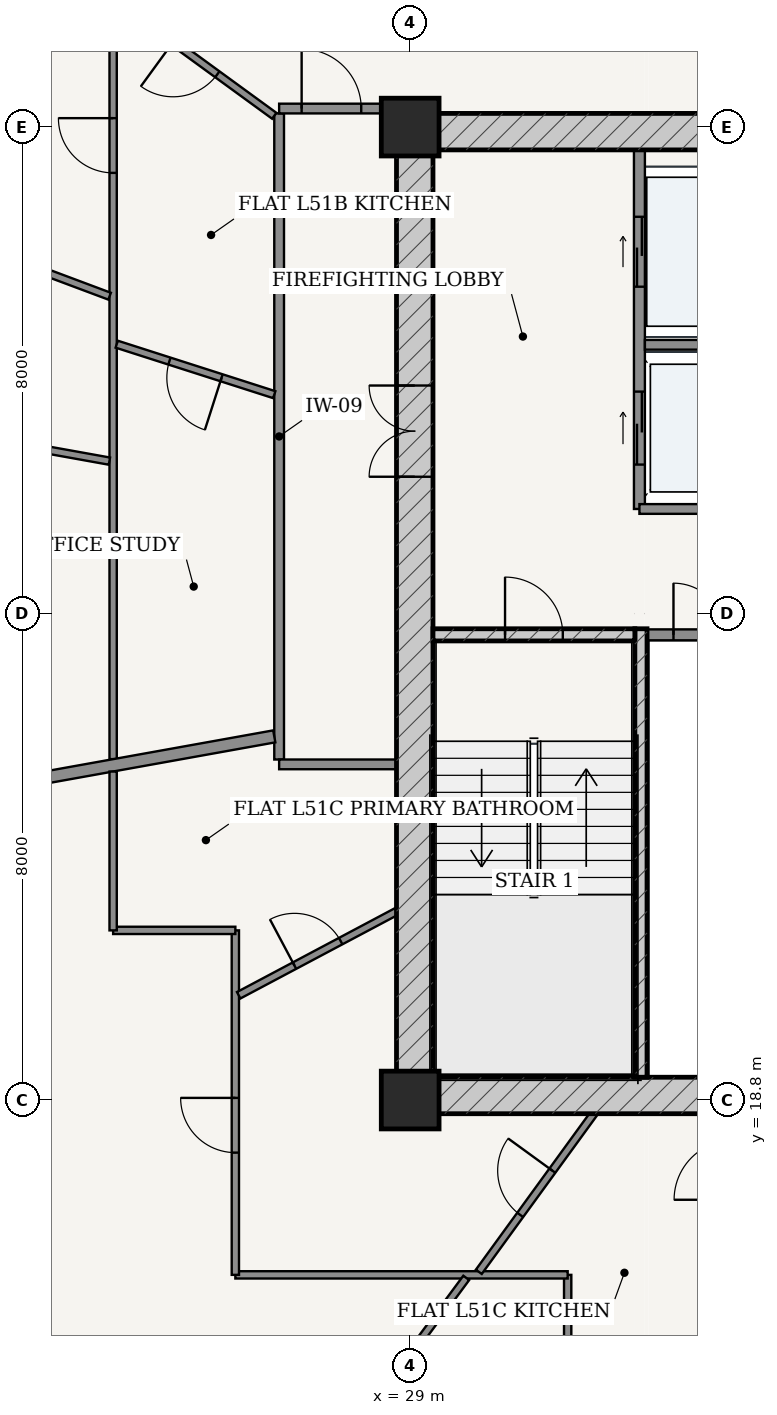
"""IFC4 building model, lengths in metres.
Left out: names, types, materials, properties, quantities, classifications, styles, units other than length and angle.
Written with IfcOpenShell. Run it as: python <this file> out.ifc"""

import sys

from ifc_helpers import new_model, si_unit, direction, frame, frame_2d, origin, origin_2d, place, context, subcontext, project, spatial, rectangle, extrude, source, transform, mapped, element, fill, save


model = new_model("IFC4")
c1 = context("Model", 3, precision=1e-05, world=origin(), true_north=direction((-0.2419218956, 0.970295726276)))
c2 = subcontext(c1, "Body", "Model", "MODEL_VIEW")
j1 = project(units=[si_unit("LENGTHUNIT", "METRE"), si_unit("PLANEANGLEUNIT", "RADIAN")], contexts=[c1])
p1 = place(None, origin())
s1 = spatial("IfcSite", under=j1, at=p1, CompositionType="ELEMENT")
p2 = place(p1, origin())
s2 = spatial("IfcBuilding", under=s1, at=p2, CompositionType="ELEMENT")
p3 = place(p2, frame((0.0, 0.0, 194.9)))
s3 = spatial("IfcBuildingStorey", under=s2, at=p3, CompositionType="ELEMENT", Elevation=194.9)
for number, where, z_axis, x_axis in (
    (1, (29.0, 18.8, 0.0), (0.0, 0.0, 1.0), (1.0, 0.0, 0.0)),
    (2, (29.0, 34.8, 0.0), (0.0, 0.0, 1.0), (1.0, 0.0, 0.0)),
):
    element("IfcColumn", number, at=place(p3, frame(where, z_axis=z_axis, x_axis=x_axis)), inside=s3, PredefinedType="COLUMN", context=c2, shape_type="SweptSolid", body=[
        extrude(rectangle(XDim=0.95, YDim=0.95, at=origin_2d()), origin(), (0.0, 0.0, 1.0), 3.7),
    ])
p4 = place(p3, frame((28.775, 18.875, 0.0), z_axis=(0.0, 0.0, 1.0), x_axis=(1.0, 0.0, 0.0)))
e3 = element("IfcWall", 3, at=p4, inside=s3, PredefinedType="SHEAR", context=c2, shape_type="SweptSolid", body=[
    extrude(rectangle(XDim=18.45, YDim=0.6, at=frame_2d((9.225, 0.0))), origin(), (0.0, 0.0, 1.0), 3.435),
])
p5 = place(p4, frame((8.8, 0.0, 0.0)))
e4 = element("IfcOpeningElement", 4, at=p5, cuts=e3, PredefinedType="OPENING", context=c2, shape_type="SweptSolid", body=[
    extrude(rectangle(XDim=0.85, YDim=2.1, at=frame_2d((0.425, 1.05))), frame((0.0, 0.31, 0.0), z_axis=(0.0, -1.0, 0.0), x_axis=(1.0, 0.0, 0.0)), (0.0, 0.0, 1.0), 0.62),
])
p6 = place(p3, frame((28.775, 34.725, 0.0), z_axis=(0.0, 0.0, 1.0), x_axis=(1.0, 0.0, 0.0)))
e5 = element("IfcWall", 5, at=p6, inside=s3, PredefinedType="SHEAR", context=c2, shape_type="SweptSolid", body=[
    extrude(rectangle(XDim=18.45, YDim=0.6, at=frame_2d((9.225, 0.0))), origin(), (0.0, 0.0, 1.0), 3.435),
])
p7 = place(p3, frame((29.075, 19.175, 0.0), z_axis=(0.0, 0.0, 1.0), x_axis=(0.0, 1.0, 0.0)))
e6 = element("IfcWall", 6, at=p7, inside=s3, PredefinedType="SHEAR", context=c2, shape_type="SweptSolid", body=[
    extrude(rectangle(XDim=15.25, YDim=0.6, at=frame_2d((7.625, 0.0))), origin(), (0.0, 0.0, 1.0), 3.435),
])
p8 = place(p7, frame((9.875, 0.0, 0.0)))
e7 = element("IfcOpeningElement", 7, at=p8, cuts=e6, PredefinedType="OPENING", context=c2, shape_type="SweptSolid", body=[
    extrude(rectangle(XDim=1.5, YDim=2.2, at=frame_2d((0.75, 1.1))), frame((0.0, 0.31, 0.0), z_axis=(0.0, -1.0, 0.0), x_axis=(1.0, 0.0, 0.0)), (0.0, 0.0, 1.0), 0.62),
])
p9 = place(p3, frame((32.795, 19.175, 0.0), z_axis=(0.0, 0.0, 1.0), x_axis=(0.0, 1.0, 0.0)))
e8 = element("IfcWall", 8, at=p9, inside=s3, PredefinedType="SOLIDWALL", context=c2, shape_type="SweptSolid", body=[
    extrude(rectangle(XDim=7.375, YDim=0.2, at=frame_2d((3.688, 0.0))), origin(), (0.0, 0.0, 1.0), 3.435),
])
p10 = place(p3, frame((29.375, 26.45, 0.0), z_axis=(0.0, 0.0, 1.0), x_axis=(1.0, 0.0, 0.0)))
e9 = element("IfcWall", 9, at=p10, inside=s3, PredefinedType="SOLIDWALL", context=c2, shape_type="SweptSolid", body=[
    extrude(rectangle(XDim=3.32, YDim=0.2, at=frame_2d((1.66, 0.0))), origin(), (0.0, 0.0, 1.0), 3.435),
])
p11 = place(p10, frame((1.185, 0.0, 0.0)))
e10 = element("IfcOpeningElement", 10, at=p11, cuts=e9, PredefinedType="OPENING", context=c2, shape_type="SweptSolid", body=[
    extrude(rectangle(XDim=0.95, YDim=2.15, at=frame_2d((0.475, 1.075))), frame((0.0, 0.11, 0.0), z_axis=(0.0, -1.0, 0.0), x_axis=(1.0, 0.0, 0.0)), (0.0, 0.0, 1.0), 0.22),
])
p12 = place(p3, frame((32.9, 26.45, 0.0), z_axis=(0.0, 0.0, 1.0), x_axis=(1.0, 0.0, 0.0)))
e11 = element("IfcWall", 11, at=p12, inside=s3, PredefinedType="PARTITIONING", context=c2, shape_type="SweptSolid", body=[
    extrude(rectangle(XDim=1.71, YDim=0.18, at=frame_2d((0.855, 0.0))), origin(), (0.0, 0.0, 1.0), 3.435),
])
p13 = place(p12, frame((0.43, 0.0, 0.0)))
e12 = element("IfcOpeningElement", 12, at=p13, cuts=e11, PredefinedType="OPENING", context=c2, shape_type="SweptSolid", body=[
    extrude(rectangle(XDim=0.85, YDim=2.1, at=frame_2d((0.425, 1.05))), frame((0.0, 0.1, 0.0), z_axis=(0.0, -1.0, 0.0), x_axis=(1.0, 0.0, 0.0)), (0.0, 0.0, 1.0), 0.2),
])
p14 = place(p3, frame((32.77, 28.52, 0.0), z_axis=(0.0, 0.0, 1.0), x_axis=(0.0, 1.0, 0.0)))
e13 = element("IfcWall", 13, at=p14, inside=s3, PredefinedType="PARTITIONING", context=c2, shape_type="SweptSolid", body=[
    extrude(rectangle(XDim=5.905, YDim=0.18, at=frame_2d((2.953, 0.0))), origin(), (0.0, 0.0, 1.0), 3.435),
])
p15 = place(p14, frame((3.655, 0.0, 0.0)))
e14 = element("IfcOpeningElement", 14, at=p15, cuts=e13, PredefinedType="OPENING", context=c2, shape_type="SweptSolid", body=[
    extrude(rectangle(XDim=1.15, YDim=2.2, at=frame_2d((0.575, 1.1))), frame((0.0, 0.1, 0.0), z_axis=(0.0, -1.0, 0.0), x_axis=(1.0, 0.0, 0.0)), (0.0, 0.0, 1.0), 0.2),
])
p16 = place(p14, frame((0.73, 0.0, 0.0)))
e15 = element("IfcOpeningElement", 15, at=p16, cuts=e13, PredefinedType="OPENING", context=c2, shape_type="SweptSolid", body=[
    extrude(rectangle(XDim=1.2, YDim=2.25, at=frame_2d((0.6, 1.125))), frame((0.0, 0.1, 0.0), z_axis=(0.0, -1.0, 0.0), x_axis=(1.0, 0.0, 0.0)), (0.0, 0.0, 1.0), 0.2),
])
p17 = place(p3, frame((32.86, 31.22, 0.0), z_axis=(0.0, 0.0, 1.0), x_axis=(1.0, 0.0, 0.0)))
e16 = element("IfcWall", 16, at=p17, inside=s3, PredefinedType="PARTITIONING", context=c2, shape_type="SweptSolid", body=[
    extrude(rectangle(XDim=1.75, YDim=0.16, at=frame_2d((0.875, 0.0))), origin(), (0.0, 0.0, 1.0), 3.435),
])
p18 = place(p3, frame((32.77, 28.52, 0.0), z_axis=(0.0, 0.0, 1.0), x_axis=(1.0, 0.0, 0.0)))
e17 = element("IfcWall", 17, at=p18, inside=s3, PredefinedType="PARTITIONING", context=c2, shape_type="SweptSolid", body=[
    extrude(rectangle(XDim=1.84, YDim=0.16, at=frame_2d((0.92, 0.0))), origin(), (0.0, 0.0, 1.0), 3.435),
])
p19 = place(p3, frame((26.845, 24.4, 0.0), z_axis=(0.0, 0.0, 1.0), x_axis=(0.0, 1.0, 0.0)))
e18 = element("IfcWall", 18, at=p19, inside=s3, PredefinedType="PARTITIONING", context=c2, shape_type="SweptSolid", body=[
    extrude(rectangle(XDim=10.625, YDim=0.16, at=frame_2d((5.312, 0.0))), origin(), (0.0, 0.0, 1.0), 2.951),
])
p20 = place(p3, frame((26.845, 35.105, 0.0), z_axis=(0.0, 0.0, 1.0), x_axis=(1.0, 0.0, 0.0)))
e19 = element("IfcWall", 19, at=p20, inside=s3, PredefinedType="PARTITIONING", context=c2, shape_type="SweptSolid", body=[
    extrude(rectangle(XDim=1.93, YDim=0.16, at=frame_2d((0.965, 0.0))), origin(), (0.0, 0.0, 1.0), 3.435),
])
p21 = place(p20, frame((0.37, 0.0, 0.0)))
e20 = element("IfcOpeningElement", 20, at=p21, cuts=e19, PredefinedType="OPENING", context=c2, shape_type="SweptSolid", body=[
    extrude(rectangle(XDim=0.98, YDim=2.2, at=frame_2d((0.49, 1.1))), frame((0.0, 0.09, 0.0), z_axis=(0.0, -1.0, 0.0), x_axis=(1.0, 0.0, 0.0)), (0.0, 0.0, 1.0), 0.18),
])
p22 = place(p3, frame((26.845, 24.32, 0.0), z_axis=(0.0, 0.0, 1.0), x_axis=(1.0, 0.0, 0.0)))
e21 = element("IfcWall", 21, at=p22, inside=s3, PredefinedType="PARTITIONING", context=c2, shape_type="SweptSolid", body=[
    extrude(rectangle(XDim=1.93, YDim=0.16, at=frame_2d((0.965, 0.0))), origin(), (0.0, 0.0, 1.0), 3.435),
])
p23 = place(p3, frame((24.115, 24.406, 0.0), z_axis=(0.0, 0.0, 1.0), x_axis=(0.0, 1.0, 0.0)))
e22 = element("IfcWall", 22, at=p23, inside=s3, PredefinedType="PARTITIONING", context=c2, shape_type="SweptSolid", body=[
    extrude(rectangle(XDim=13.429, YDim=0.12, at=frame_2d((6.714, 0.0))), origin(), (0.0, 0.0, 1.0), 2.951),
])
p24 = place(p23, frame((9.641, 0.0, 0.0)))
e23 = element("IfcOpeningElement", 23, at=p24, cuts=e22, PredefinedType="OPENING", context=c2, shape_type="SweptSolid", body=[
    extrude(rectangle(XDim=0.9, YDim=2.15, at=frame_2d((0.45, 1.075))), frame((0.0, 0.07, 0.0), z_axis=(0.0, -1.0, 0.0), x_axis=(1.0, 0.0, 0.0)), (0.0, 0.0, 1.0), 0.14),
])
p25 = place(p3, frame((24.057, 32.019, 0.0), z_axis=(0.0, 0.0, 1.0), x_axis=(-0.936540194592, 0.350560214389, 0.0)))
e24 = element("IfcWall", 24, at=p25, inside=s3, PredefinedType="PARTITIONING", context=c2, shape_type="SweptSolid", body=[
    extrude(rectangle(XDim=6.556, YDim=0.12, at=frame_2d((3.278, 0.0))), origin(), (0.0, 0.0, 1.0), 2.951),
])
p26 = place(p25, frame((2.828, 0.0, 0.0)))
e25 = element("IfcOpeningElement", 25, at=p26, cuts=e24, PredefinedType="OPENING", context=c2, shape_type="SweptSolid", body=[
    extrude(rectangle(XDim=0.9, YDim=2.15, at=frame_2d((0.45, 1.075))), frame((0.0, 0.07, 0.0), z_axis=(0.0, -1.0, 0.0), x_axis=(1.0, 0.0, 0.0)), (0.0, 0.0, 1.0), 0.14),
])
p27 = place(p3, frame((24.054, 29.307, 0.0), z_axis=(0.0, 0.0, 1.0), x_axis=(-0.984227185588, 0.176909149424, 0.0)))
e26 = element("IfcWall", 26, at=p27, inside=s3, PredefinedType="PARTITIONING", context=c2, shape_type="SweptSolid", body=[
    extrude(rectangle(XDim=7.448, YDim=0.12, at=frame_2d((3.724, 0.0))), origin(), (0.0, 0.0, 1.0), 2.951),
])
p28 = place(p27, frame((2.264, 0.0, 0.0)))
e27 = element("IfcOpeningElement", 27, at=p28, cuts=e26, PredefinedType="OPENING", context=c2, shape_type="SweptSolid", body=[
    extrude(rectangle(XDim=0.9, YDim=2.15, at=frame_2d((0.45, 1.075))), frame((0.0, 0.07, 0.0), z_axis=(0.0, -1.0, 0.0), x_axis=(1.0, 0.0, 0.0)), (0.0, 0.0, 1.0), 0.14),
])
p29 = place(p3, frame((34.397, 35.027, 0.0), z_axis=(0.0, 0.0, 1.0), x_axis=(-0.401135725485, 0.916018629581, 0.0)))
e28 = element("IfcWall", 28, at=p29, inside=s3, PredefinedType="PARTITIONING", context=c2, shape_type="SweptSolid", body=[
    extrude(rectangle(XDim=2.829, YDim=0.12, at=frame_2d((1.415, 0.0))), origin(), (0.0, 0.0, 1.0), 3.435),
])
p30 = place(p29, frame((0.985, 0.0, 0.0)))
e29 = element("IfcOpeningElement", 29, at=p30, cuts=e28, PredefinedType="OPENING", context=c2, shape_type="SweptSolid", body=[
    extrude(rectangle(XDim=0.86, YDim=2.15, at=frame_2d((0.43, 1.075))), frame((0.0, 0.07, 0.0), z_axis=(0.0, -1.0, 0.0), x_axis=(1.0, 0.0, 0.0)), (0.0, 0.0, 1.0), 0.14),
])
p31 = place(p3, frame((26.765, 34.986, 0.0), z_axis=(0.0, 0.0, 1.0), x_axis=(-0.808220499107, 0.588879974887, 0.0)))
e30 = element("IfcWall", 30, at=p31, inside=s3, PredefinedType="PARTITIONING", context=c2, shape_type="SweptSolid", body=[
    extrude(rectangle(XDim=3.217, YDim=0.12, at=frame_2d((1.608, 0.0))), origin(), (0.0, 0.0, 1.0), 3.11),
])
p32 = place(p31, frame((1.158, 0.0, 0.0)))
e31 = element("IfcOpeningElement", 31, at=p32, cuts=e30, PredefinedType="OPENING", context=c2, shape_type="SweptSolid", body=[
    extrude(rectangle(XDim=0.9, YDim=2.15, at=frame_2d((0.45, 1.075))), frame((0.0, 0.07, 0.0), z_axis=(0.0, -1.0, 0.0), x_axis=(1.0, 0.0, 0.0)), (0.0, 0.0, 1.0), 0.14),
])
p33 = place(p3, frame((26.765, 30.4, 0.0), z_axis=(0.0, 0.0, 1.0), x_axis=(-0.952315722301, 0.305114347514, 0.0)))
e32 = element("IfcWall", 32, at=p33, inside=s3, PredefinedType="PARTITIONING", context=c2, shape_type="SweptSolid", body=[
    extrude(rectangle(XDim=2.72, YDim=0.12, at=frame_2d((1.36, 0.0))), origin(), (0.0, 0.0, 1.0), 3.435),
])
p34 = place(p33, frame((0.91, 0.0, 0.0)))
e33 = element("IfcOpeningElement", 33, at=p34, cuts=e32, PredefinedType="OPENING", context=c2, shape_type="SweptSolid", body=[
    extrude(rectangle(XDim=0.9, YDim=2.15, at=frame_2d((0.45, 1.075))), frame((0.0, 0.07, 0.0), z_axis=(0.0, -1.0, 0.0), x_axis=(1.0, 0.0, 0.0)), (0.0, 0.0, 1.0), 0.14),
])
p35 = place(p3, frame((26.765, 24.781, 0.0), z_axis=(0.0, 0.0, 1.0), x_axis=(-0.984226684914, -0.176911934879, 0.0)))
e34 = element("IfcWall", 34, at=p35, inside=s3, PredefinedType="PARTITIONING", context=c2, shape_type="SweptSolid", body=[
    extrude(rectangle(XDim=10.202, YDim=0.2, at=frame_2d((5.101, 0.0))), origin(), (0.0, 0.0, 1.0), 2.951),
])
p36 = place(p3, frame((31.59, 13.915, 0.0), z_axis=(0.0, 0.0, 1.0), x_axis=(0.0, 1.0, 0.0)))
e35 = element("IfcWall", 35, at=p36, inside=s3, PredefinedType="PARTITIONING", context=c2, shape_type="SweptSolid", body=[
    extrude(rectangle(XDim=2.01, YDim=0.12, at=frame_2d((1.005, 0.0))), origin(), (0.0, 0.0, 1.0), 3.11),
])
p37 = place(p3, frame((31.59, 15.925, 0.0), z_axis=(0.0, 0.0, 1.0), x_axis=(-1.0, 0.0, 0.0)))
e36 = element("IfcWall", 36, at=p37, inside=s3, PredefinedType="PARTITIONING", context=c2, shape_type="SweptSolid", body=[
    extrude(rectangle(XDim=5.465, YDim=0.12, at=frame_2d((2.732, 0.0))), origin(), (0.0, 0.0, 1.0), 2.951),
])
p38 = place(p3, frame((26.125, 15.925, 0.0), z_axis=(0.0, 0.0, 1.0), x_axis=(0.0, 1.0, 0.0)))
e37 = element("IfcWall", 37, at=p38, inside=s3, PredefinedType="PARTITIONING", context=c2, shape_type="SweptSolid", body=[
    extrude(rectangle(XDim=5.665, YDim=0.12, at=frame_2d((2.833, 0.0))), origin(), (0.0, 0.0, 1.0), 2.951),
])
p39 = place(p38, frame((2.01, 0.0, 0.0)))
e38 = element("IfcOpeningElement", 38, at=p39, cuts=e37, PredefinedType="OPENING", context=c2, shape_type="SweptSolid", body=[
    extrude(rectangle(XDim=0.9, YDim=2.15, at=frame_2d((0.45, 1.075))), frame((0.0, 0.07, 0.0), z_axis=(0.0, -1.0, 0.0), x_axis=(1.0, 0.0, 0.0)), (0.0, 0.0, 1.0), 0.14),
])
p40 = place(p3, frame((26.125, 21.59, 0.0), z_axis=(0.0, 0.0, 1.0), x_axis=(-1.0, 0.0, 0.0)))
e39 = element("IfcWall", 39, at=p40, inside=s3, PredefinedType="PARTITIONING", context=c2, shape_type="SweptSolid", body=[
    extrude(rectangle(XDim=2.01, YDim=0.12, at=frame_2d((1.005, 0.0))), origin(), (0.0, 0.0, 1.0), 3.11),
])
p41 = place(p3, frame((24.115, 21.59, 0.0), z_axis=(0.0, 0.0, 1.0), x_axis=(0.0, 1.0, 0.0)))
e40 = element("IfcWall", 40, at=p41, inside=s3, PredefinedType="PARTITIONING", context=c2, shape_type="SweptSolid", body=[
    extrude(rectangle(XDim=2.612, YDim=0.12, at=frame_2d((1.306, 0.0))), origin(), (0.0, 0.0, 1.0), 3.11),
])
p42 = place(p3, frame((29.922, 15.875, 0.0), z_axis=(0.0, 0.0, 1.0), x_axis=(-0.594524636617, -0.804077394568, 0.0)))
e41 = element("IfcWall", 41, at=p42, inside=s3, PredefinedType="PARTITIONING", context=c2, shape_type="SweptSolid", body=[
    extrude(rectangle(XDim=6.68, YDim=0.12, at=frame_2d((3.34, 0.0))), origin(), (0.0, 0.0, 1.0), 2.951),
])
p43 = place(p3, frame((28.775, 21.901, 0.0), z_axis=(0.0, 0.0, 1.0), x_axis=(-0.883156592468, -0.46907828044, 0.0)))
e42 = element("IfcWall", 42, at=p43, inside=s3, PredefinedType="PARTITIONING", context=c2, shape_type="SweptSolid", body=[
    extrude(rectangle(XDim=2.938, YDim=0.12, at=frame_2d((1.469, 0.0))), origin(), (0.0, 0.0, 1.0), 3.435),
])
p44 = place(p43, frame((1.039, 0.0, 0.0)))
e43 = element("IfcOpeningElement", 43, at=p44, cuts=e42, PredefinedType="OPENING", context=c2, shape_type="SweptSolid", body=[
    extrude(rectangle(XDim=0.86, YDim=2.15, at=frame_2d((0.43, 1.075))), frame((0.0, 0.07, 0.0), z_axis=(0.0, -1.0, 0.0), x_axis=(1.0, 0.0, 0.0)), (0.0, 0.0, 1.0), 0.14),
])
p45 = place(p3, frame((32.019, 18.575, 0.0), z_axis=(0.0, 0.0, 1.0), x_axis=(-0.588135570825, -0.808762357143, 0.0)))
e44 = element("IfcWall", 44, at=p45, inside=s3, PredefinedType="PARTITIONING", context=c2, shape_type="SweptSolid", body=[
    extrude(rectangle(XDim=3.215, YDim=0.12, at=frame_2d((1.607, 0.0))), origin(), (0.0, 0.0, 1.0), 3.435),
])
p46 = place(p45, frame((1.157, 0.0, 0.0)))
e45 = element("IfcOpeningElement", 45, at=p46, cuts=e44, PredefinedType="OPENING", context=c2, shape_type="SweptSolid", body=[
    extrude(rectangle(XDim=0.9, YDim=2.15, at=frame_2d((0.45, 1.075))), frame((0.0, 0.07, 0.0), z_axis=(0.0, -1.0, 0.0), x_axis=(1.0, 0.0, 0.0)), (0.0, 0.0, 1.0), 0.14),
])
m1 = source(origin(), c2, "Body", "SweptSolid", [
    extrude(rectangle(XDim=1.5, YDim=2.2, at=frame_2d((0.75, 1.1))), frame((0.0, 0.025, 0.0), z_axis=(0.0, -1.0, 0.0), x_axis=(1.0, 0.0, 0.0)), (0.0, 0.0, 1.0), 0.05),
])
p47 = place(p8, origin())
e46 = element("IfcDoor", 46, at=p47, inside=s3, OperationType="DOUBLE_DOOR_SINGLE_SWING", PredefinedType="DOOR", context=c2, shape_type="MappedRepresentation", body=[
    mapped(m1, transform((0.0, 0.0, 0.0), scale=1.0)),
])
fill(e7, e46)
m2 = source(origin(), c2, "Body", "SweptSolid", [
    extrude(rectangle(XDim=0.95, YDim=2.15, at=frame_2d((0.475, 1.075))), frame((0.0, 0.025, 0.0), z_axis=(0.0, -1.0, 0.0), x_axis=(1.0, 0.0, 0.0)), (0.0, 0.0, 1.0), 0.05),
])
p48 = place(p11, origin())
e47 = element("IfcDoor", 47, at=p48, inside=s3, OperationType="SINGLE_SWING_LEFT", PredefinedType="DOOR", context=c2, shape_type="MappedRepresentation", body=[
    mapped(m2, transform((0.0, 0.0, 0.0), scale=1.0)),
])
fill(e10, e47)
m3 = source(origin(), c2, "Body", "SweptSolid", [
    extrude(rectangle(XDim=0.85, YDim=2.1, at=frame_2d((0.425, 1.05))), frame((0.0, 0.025, 0.0), z_axis=(0.0, -1.0, 0.0), x_axis=(1.0, 0.0, 0.0)), (0.0, 0.0, 1.0), 0.05),
])
p49 = place(p13, origin())
e48 = element("IfcDoor", 48, at=p49, inside=s3, OperationType="SINGLE_SWING_LEFT", PredefinedType="DOOR", context=c2, shape_type="MappedRepresentation", body=[
    mapped(m3, transform((0.0, 0.0, 0.0), scale=1.0)),
])
fill(e12, e48)
m4 = source(origin(), c2, "Body", "SweptSolid", [
    extrude(rectangle(XDim=1.15, YDim=2.2, at=frame_2d((0.575, 1.1))), frame((0.0, 0.025, 0.0), z_axis=(0.0, -1.0, 0.0), x_axis=(1.0, 0.0, 0.0)), (0.0, 0.0, 1.0), 0.05),
])
p50 = place(p15, origin())
e49 = element("IfcDoor", 49, at=p50, inside=s3, OperationType="DOUBLE_DOOR_SLIDING", PredefinedType="DOOR", context=c2, shape_type="MappedRepresentation", body=[
    mapped(m4, transform((0.0, 0.0, 0.0), scale=1.0)),
])
fill(e14, e49)
m5 = source(origin(), c2, "Body", "SweptSolid", [
    extrude(rectangle(XDim=1.2, YDim=2.25, at=frame_2d((0.6, 1.125))), frame((0.0, 0.025, 0.0), z_axis=(0.0, -1.0, 0.0), x_axis=(1.0, 0.0, 0.0)), (0.0, 0.0, 1.0), 0.05),
])
p51 = place(p16, origin())
e50 = element("IfcDoor", 50, at=p51, inside=s3, OperationType="DOUBLE_DOOR_SLIDING", PredefinedType="DOOR", context=c2, shape_type="MappedRepresentation", body=[
    mapped(m5, transform((0.0, 0.0, 0.0), scale=1.0)),
])
fill(e15, e50)
m6 = source(origin(), c2, "Body", "SweptSolid", [
    extrude(rectangle(XDim=0.98, YDim=2.2, at=frame_2d((0.49, 1.1))), frame((0.0, 0.025, 0.0), z_axis=(0.0, -1.0, 0.0), x_axis=(1.0, 0.0, 0.0)), (0.0, 0.0, 1.0), 0.05),
])
p52 = place(p21, origin())
e51 = element("IfcDoor", 51, at=p52, inside=s3, OperationType="SINGLE_SWING_LEFT", PredefinedType="DOOR", context=c2, shape_type="MappedRepresentation", body=[
    mapped(m6, transform((0.0, 0.0, 0.0), scale=1.0)),
])
fill(e20, e51)
m7 = source(origin(), c2, "Body", "SweptSolid", [
    extrude(rectangle(XDim=0.86, YDim=2.15, at=frame_2d((0.43, 1.075))), frame((0.0, 0.025, 0.0), z_axis=(0.0, -1.0, 0.0), x_axis=(1.0, 0.0, 0.0)), (0.0, 0.0, 1.0), 0.05),
])
p53 = place(p30, frame((0.86, 0.0, 0.0), z_axis=(0.0, 0.0, 1.0), x_axis=(-1.0, 0.0, 0.0)))
e52 = element("IfcDoor", 52, at=p53, inside=s3, OperationType="SINGLE_SWING_RIGHT", PredefinedType="DOOR", context=c2, shape_type="MappedRepresentation", body=[
    mapped(m7, transform((0.0, 0.0, 0.0), scale=1.0)),
])
fill(e29, e52)
m8 = source(origin(), c2, "Body", "SweptSolid", [
    extrude(rectangle(XDim=0.9, YDim=2.15, at=frame_2d((0.45, 1.075))), frame((0.0, 0.025, 0.0), z_axis=(0.0, -1.0, 0.0), x_axis=(1.0, 0.0, 0.0)), (0.0, 0.0, 1.0), 0.05),
])
p54 = place(p32, origin())
e53 = element("IfcDoor", 53, at=p54, inside=s3, OperationType="SINGLE_SWING_RIGHT", PredefinedType="DOOR", context=c2, shape_type="MappedRepresentation", body=[
    mapped(m8, transform((0.0, 0.0, 0.0), scale=1.0)),
])
fill(e31, e53)
p55 = place(p34, origin())
e54 = element("IfcDoor", 54, at=p55, inside=s3, OperationType="SINGLE_SWING_LEFT", PredefinedType="DOOR", context=c2, shape_type="MappedRepresentation", body=[
    mapped(m8, transform((0.0, 0.0, 0.0), scale=1.0)),
])
fill(e33, e54)
p56 = place(p24, origin())
e55 = element("IfcDoor", 55, at=p56, inside=s3, OperationType="SINGLE_SWING_RIGHT", PredefinedType="DOOR", context=c2, shape_type="MappedRepresentation", body=[
    mapped(m8, transform((0.0, 0.0, 0.0), scale=1.0)),
])
fill(e23, e55)
p57 = place(p46, frame((0.9, 0.0, 0.0), z_axis=(0.0, 0.0, 1.0), x_axis=(-1.0, 0.0, 0.0)))
e56 = element("IfcDoor", 56, at=p57, inside=s3, OperationType="SINGLE_SWING_RIGHT", PredefinedType="DOOR", context=c2, shape_type="MappedRepresentation", body=[
    mapped(m8, transform((0.0, 0.0, 0.0), scale=1.0)),
])
fill(e45, e56)
p58 = place(p44, frame((0.86, 0.0, 0.0), z_axis=(0.0, 0.0, 1.0), x_axis=(-1.0, 0.0, 0.0)))
e57 = element("IfcDoor", 57, at=p58, inside=s3, OperationType="SINGLE_SWING_LEFT", PredefinedType="DOOR", context=c2, shape_type="MappedRepresentation", body=[
    mapped(m7, transform((0.0, 0.0, 0.0), scale=1.0)),
])
fill(e43, e57)
p59 = place(p39, origin())
e58 = element("IfcDoor", 58, at=p59, inside=s3, OperationType="SINGLE_SWING_RIGHT", PredefinedType="DOOR", context=c2, shape_type="MappedRepresentation", body=[
    mapped(m8, transform((0.0, 0.0, 0.0), scale=1.0)),
])
fill(e38, e58)
save(model, sys.argv[1])
